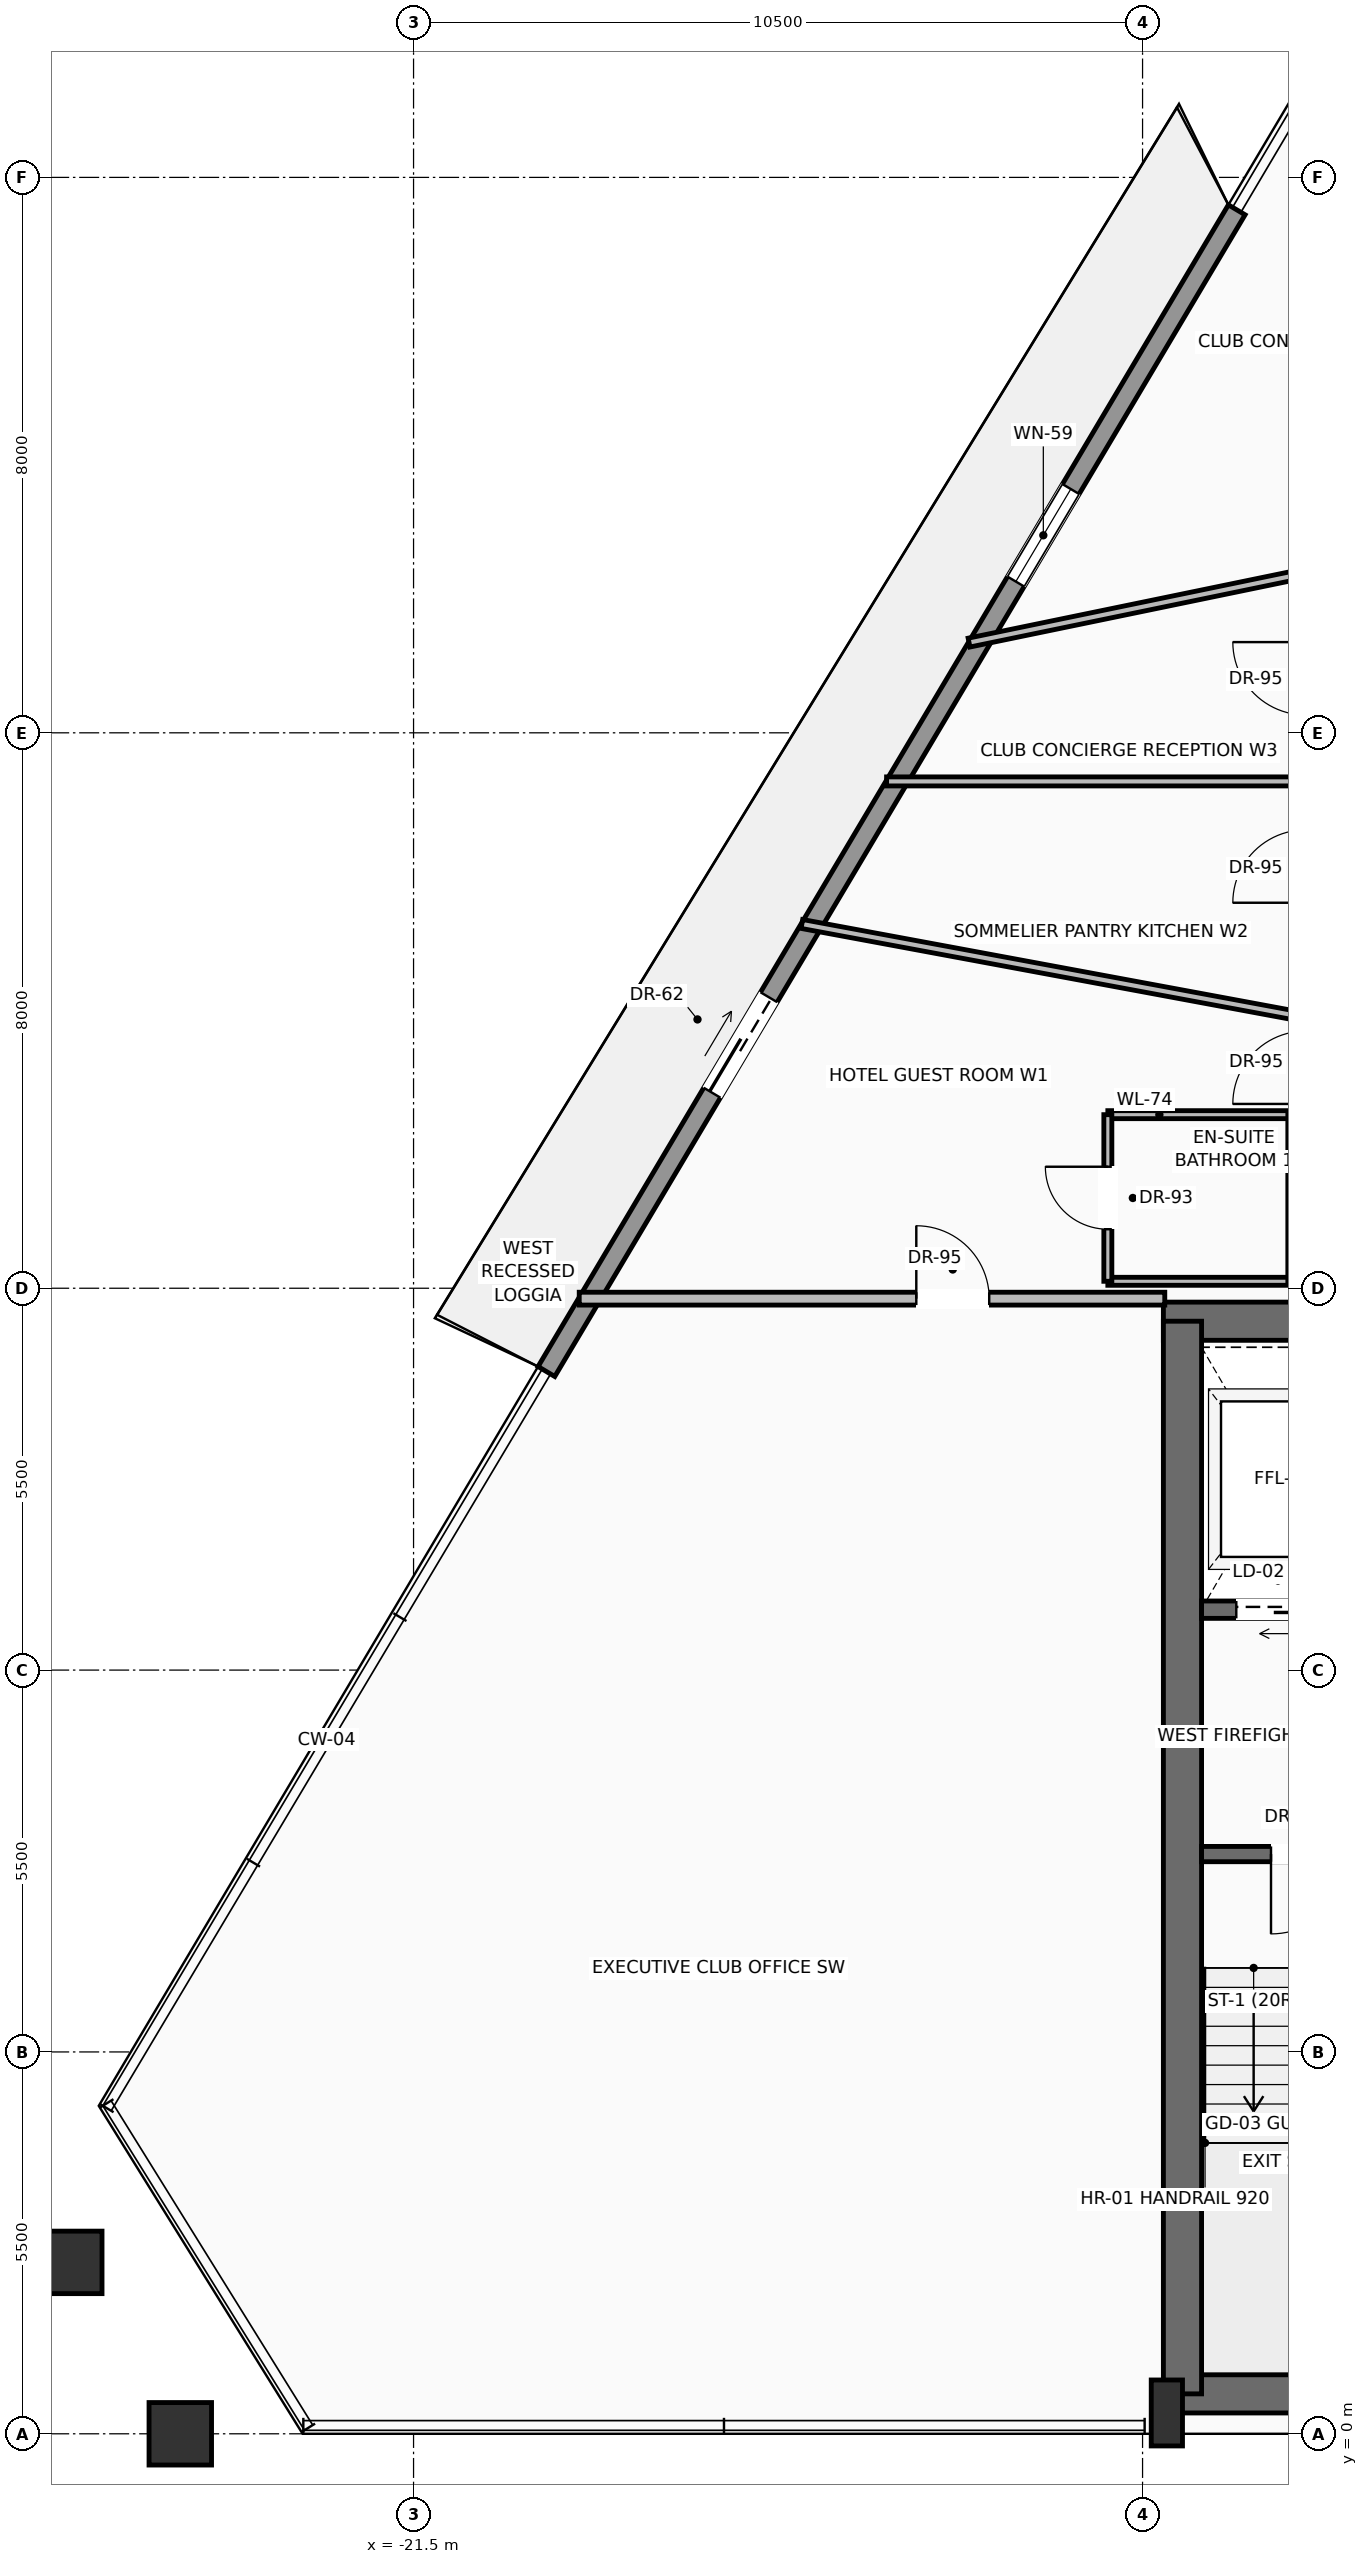
"""IFC4 building model, lengths in metres.
Left out: names, types, materials, properties, quantities, classifications, styles, units other than length and angle.
Written with IfcOpenShell. Run it as: python <this file> out.ifc"""

import sys

from ifc_helpers import new_model, si_unit, direction, frame, frame_2d, origin, origin_2d, place, context, subcontext, project, spatial, rectangle, hollow_rectangle, extrude, source, transform, mapped, element, fill, save


model = new_model("IFC4")
c1 = context("Model", 3, precision=1e-05, world=origin(), true_north=direction((0.0, 1.0)))
c2 = subcontext(c1, "Body", "Model", "MODEL_VIEW")
j1 = project(units=[si_unit("LENGTHUNIT", "METRE"), si_unit("PLANEANGLEUNIT", "RADIAN")], contexts=[c1])
p1 = place(None, origin())
s1 = spatial("IfcSite", under=j1, at=p1, CompositionType="ELEMENT")
p2 = place(p1, origin())
s2 = spatial("IfcBuilding", under=s1, at=p2, CompositionType="ELEMENT")
p3 = place(p2, frame((0.0, 0.0, 230.35)))
s3 = spatial("IfcBuildingStorey", under=s2, at=p3, CompositionType="ELEMENT", Elevation=230.35)
p4 = place(p3, frame((-10.65, 0.575, 0.0), z_axis=(0.0, 0.0, 1.0), x_axis=(1.0, 0.0, 0.0)))
e1 = element("IfcWall", 1, at=p4, inside=s3, PredefinedType="SHEAR", context=c2, shape_type="SweptSolid", body=[
    extrude(rectangle(XDim=21.3, YDim=0.55, at=frame_2d((10.65, 0.0))), origin(), (0.0, 0.0, 1.0), 3.24),
])
p5 = place(p3, frame((-10.7, 16.025, 0.0), z_axis=(0.0, 0.0, 1.0), x_axis=(1.0, 0.0, 0.0)))
e2 = element("IfcWall", 2, at=p5, inside=s3, PredefinedType="SHEAR", context=c2, shape_type="SweptSolid", body=[
    extrude(rectangle(XDim=21.4, YDim=0.55, at=frame_2d((10.7, 0.0))), origin(), (0.0, 0.0, 1.0), 3.24),
])
p6 = place(p5, frame((3.27, 0.0, 0.0)))
e3 = element("IfcOpeningElement", 3, at=p6, cuts=e2, PredefinedType="OPENING", context=c2, shape_type="SweptSolid", body=[
    extrude(rectangle(XDim=1.3, YDim=2.3, at=frame_2d((0.65, 1.15))), frame((0.0, 0.285, 0.0), z_axis=(0.0, -1.0, 0.0), x_axis=(1.0, 0.0, 0.0)), (0.0, 0.0, 1.0), 0.57),
])
p7 = place(p5, frame((9.7, 0.0, 0.0)))
e4 = element("IfcOpeningElement", 4, at=p7, cuts=e2, PredefinedType="OPENING", context=c2, shape_type="SweptSolid", body=[
    extrude(rectangle(XDim=2.0, YDim=2.4, at=frame_2d((1.0, 1.2))), frame((0.0, 0.285, 0.0), z_axis=(0.0, -1.0, 0.0), x_axis=(1.0, 0.0, 0.0)), (0.0, 0.0, 1.0), 0.57),
])
p8 = place(p3, frame((-10.425, 0.575, 0.0), z_axis=(0.0, 0.0, 1.0), x_axis=(0.0, 1.0, 0.0)))
e5 = element("IfcWall", 5, at=p8, inside=s3, PredefinedType="SHEAR", context=c2, shape_type="SweptSolid", body=[
    extrude(rectangle(XDim=15.45, YDim=0.55, at=frame_2d((7.725, 0.0))), origin(), (0.0, 0.0, 1.0), 3.24),
])
m1 = source(origin(), c2, "Body", "SweptSolid", [
    extrude(rectangle(XDim=0.45, YDim=0.95, at=origin_2d()), origin(), (0.0, 0.0, 1.0), 3.45),
])
p9 = place(p3, frame((-10.65, 0.3, 0.0), z_axis=(0.0, 0.0, 1.0), x_axis=(1.0, 0.0, 0.0)))
e6 = element("IfcColumn", 6, at=p9, inside=s3, PredefinedType="PILASTER", context=c2, shape_type="MappedRepresentation", body=[
    mapped(m1, transform((0.0, 0.0, 0.0), scale=1.0)),
])
m2 = source(origin(), c2, "Body", "SweptSolid", [
    extrude(hollow_rectangle(XDim=0.9, YDim=0.9, WallThickness=0.045, at=origin_2d()), origin(), (0.0, 0.0, 1.0), 3.441),
])
p10 = place(p3, frame((-24.86, 0.0, 0.004), z_axis=(-0.003973008728, 0.0, 0.99999210757), x_axis=(0.0, -1.0, 0.0)))
e7 = element("IfcColumn", 7, at=p10, inside=s3, PredefinedType="COLUMN", context=c2, shape_type="MappedRepresentation", body=[
    mapped(m2, transform((0.0, 0.0, 0.0), scale=1.0)),
])
m3 = source(origin(), c2, "Body", "SweptSolid", [
    extrude(hollow_rectangle(XDim=0.9, YDim=0.9, WallThickness=0.045, at=origin_2d()), origin(), (0.0, 0.0, 1.0), 3.442),
])
p11 = place(p3, frame((-26.437, 2.469, 0.004), z_axis=(0.008299266105, -0.017449738989, 0.999813296967), x_axis=(0.903063984632, 0.429506041471, 0.0)))
e8 = element("IfcColumn", 8, at=p11, inside=s3, PredefinedType="COLUMN", context=c2, shape_type="MappedRepresentation", body=[
    mapped(m3, transform((0.0, 0.0, 0.0), scale=1.0)),
])
p12 = place(p3, frame((-19.586, 15.3, 0.0), z_axis=(0.0, 0.0, 1.0), x_axis=(0.510822157644, 0.859686409838, 0.0)))
e9 = element("IfcWall", 9, at=p12, inside=s3, PredefinedType="SOLIDWALL", context=c2, shape_type="SweptSolid", body=[
    extrude(rectangle(XDim=19.464, YDim=0.28, at=frame_2d((9.732, 0.0))), origin(), (0.0, 0.0, 1.0), 2.82),
])
p13 = place(p12, frame((4.671, 0.0, 0.0)))
e10 = element("IfcOpeningElement", 10, at=p13, cuts=e9, PredefinedType="OPENING", context=c2, shape_type="SweptSolid", body=[
    extrude(rectangle(XDim=1.6, YDim=2.35, at=frame_2d((0.8, 1.175))), frame((0.0, 0.15, 0.0), z_axis=(0.0, -1.0, 0.0), x_axis=(1.0, 0.0, 0.0)), (0.0, 0.0, 1.0), 0.3),
])
p14 = place(p12, frame((13.236, 0.0, 0.9)))
e11 = element("IfcOpeningElement", 11, at=p14, cuts=e9, PredefinedType="OPENING", context=c2, shape_type="SweptSolid", body=[
    extrude(rectangle(XDim=1.55, YDim=1.75, at=frame_2d((0.775, 0.875))), frame((0.0, 0.15, 0.0), z_axis=(0.0, -1.0, 0.0), x_axis=(1.0, 0.0, 0.0)), (0.0, 0.0, 1.0), 0.3),
])
p15 = place(p3, frame((-5.5, 8.35, 0.0), z_axis=(0.0, 0.0, 1.0), x_axis=(-1.0, 0.0, 0.0)))
e12 = element("IfcWall", 12, at=p15, inside=s3, PredefinedType="SOLIDWALL", context=c2, shape_type="SweptSolid", body=[
    extrude(rectangle(XDim=4.65, YDim=0.22, at=frame_2d((2.325, 0.0))), origin(), (0.0, 0.0, 1.0), 3.24),
])
p16 = place(p15, frame((2.5, 0.0, 0.0)))
e13 = element("IfcOpeningElement", 13, at=p16, cuts=e12, PredefinedType="OPENING", context=c2, shape_type="SweptSolid", body=[
    extrude(rectangle(XDim=1.15, YDim=2.2, at=frame_2d((0.575, 1.1))), frame((0.0, 0.12, 0.0), z_axis=(0.0, -1.0, 0.0), x_axis=(1.0, 0.0, 0.0)), (0.0, 0.0, 1.0), 0.24),
])
p17 = place(p3, frame((-5.5, 11.87, 0.0), z_axis=(0.0, 0.0, 1.0), x_axis=(-1.0, 0.0, 0.0)))
e14 = element("IfcWall", 14, at=p17, inside=s3, PredefinedType="SOLIDWALL", context=c2, shape_type="SweptSolid", body=[
    extrude(rectangle(XDim=4.65, YDim=0.25, at=frame_2d((2.325, 0.0))), origin(), (0.0, 0.0, 1.0), 3.24),
])
p18 = place(p17, frame((2.95, 0.0, 0.0)))
e15 = element("IfcOpeningElement", 15, at=p18, cuts=e14, PredefinedType="OPENING", context=c2, shape_type="SweptSolid", body=[
    extrude(rectangle(XDim=1.2, YDim=2.25, at=frame_2d((0.6, 1.125))), frame((0.0, 0.135, 0.0), z_axis=(0.0, -1.0, 0.0), x_axis=(1.0, 0.0, 0.0)), (0.0, 0.0, 1.0), 0.27),
])
p19 = place(p3, frame((-19.114, 16.35, 0.0), z_axis=(0.0, 0.0, 1.0), x_axis=(1.0, 0.0, 0.0)))
e16 = element("IfcWall", 16, at=p19, inside=s3, PredefinedType="PARTITIONING", context=c2, shape_type="SweptSolid", body=[
    extrude(rectangle(XDim=8.434, YDim=0.185, at=frame_2d((4.217, 0.0))), origin(), (0.0, 0.0, 1.0), 3.232),
])
p20 = place(p19, frame((4.855, 0.0, 0.0)))
e17 = element("IfcOpeningElement", 17, at=p20, cuts=e16, PredefinedType="OPENING", context=c2, shape_type="SweptSolid", body=[
    extrude(rectangle(XDim=1.05, YDim=2.25, at=frame_2d((0.525, 1.125))), frame((0.0, 0.103, 0.0), z_axis=(0.0, -1.0, 0.0), x_axis=(1.0, 0.0, 0.0)), (0.0, 0.0, 1.0), 0.205),
])
p21 = place(p3, frame((-13.499, 25.799, 0.0), z_axis=(0.0, 0.0, 1.0), x_axis=(0.979359822394, 0.202124561301, 0.0)))
e18 = element("IfcWall", 18, at=p21, inside=s3, PredefinedType="PARTITIONING", context=c2, shape_type="SweptSolid", body=[
    extrude(rectangle(XDim=4.951, YDim=0.13, at=frame_2d((2.476, 0.0))), origin(), (0.0, 0.0, 1.0), 3.232),
])
for number, where, z_axis, x_axis in (
    (19, (-11.5, 16.6, 0.0), (0.0, 0.0, 1.0), (1.0, 0.0, 0.0)),
    (20, (-11.5, 19.0, 0.0), (0.0, 0.0, 1.0), (1.0, 0.0, 0.0)),
):
    element("IfcWall", number, at=place(p3, frame(where, z_axis=z_axis, x_axis=x_axis)), inside=s3, PredefinedType="PARTITIONING", context=c2, shape_type="SweptSolid", body=[
        extrude(rectangle(XDim=2.65, YDim=0.115, at=frame_2d((1.325, 0.0))), origin(), (0.0, 0.0, 1.0), 3.232),
    ])
p22 = place(p3, frame((-11.5, 16.6, 0.0), z_axis=(0.0, 0.0, 1.0), x_axis=(0.0, 1.0, 0.0)))
e21 = element("IfcWall", 21, at=p22, inside=s3, PredefinedType="PARTITIONING", context=c2, shape_type="SweptSolid", body=[
    extrude(rectangle(XDim=2.4, YDim=0.115, at=frame_2d((1.2, 0.0))), origin(), (0.0, 0.0, 1.0), 3.232),
])
p23 = place(p22, frame((0.75, 0.0, 0.0)))
e22 = element("IfcOpeningElement", 22, at=p23, cuts=e21, PredefinedType="OPENING", context=c2, shape_type="SweptSolid", body=[
    extrude(rectangle(XDim=0.9, YDim=2.15, at=frame_2d((0.45, 1.075))), frame((0.0, 0.067, 0.0), z_axis=(0.0, -1.0, 0.0), x_axis=(1.0, 0.0, 0.0)), (0.0, 0.0, 1.0), 0.135),
])
p24 = place(p3, frame((-8.85, 16.6, 0.0), z_axis=(0.0, 0.0, 1.0), x_axis=(0.0, 1.0, 0.0)))
e23 = element("IfcWall", 23, at=p24, inside=s3, PredefinedType="PARTITIONING", context=c2, shape_type="SweptSolid", body=[
    extrude(rectangle(XDim=2.4, YDim=0.115, at=frame_2d((1.2, 0.0))), origin(), (0.0, 0.0, 1.0), 3.232),
])
p25 = place(p3, frame((-15.907, 21.747, 0.0), z_axis=(0.0, 0.0, 1.0), x_axis=(0.98321459924, -0.182452875674, 0.0)))
e24 = element("IfcWall", 24, at=p25, inside=s3, PredefinedType="PARTITIONING", context=c2, shape_type="SweptSolid", body=[
    extrude(rectangle(XDim=7.381, YDim=0.13, at=frame_2d((3.69, 0.0))), origin(), (0.0, 0.0, 1.0), 3.232),
])
p26 = place(p3, frame((-14.687, 23.8, 0.0), z_axis=(0.0, 0.0, 1.0), x_axis=(1.0, 0.0, 0.0)))
e25 = element("IfcWall", 25, at=p26, inside=s3, PredefinedType="PARTITIONING", context=c2, shape_type="SweptSolid", body=[
    extrude(rectangle(XDim=6.037, YDim=0.13, at=frame_2d((3.019, 0.0))), origin(), (0.0, 0.0, 1.0), 3.232),
])
m4 = source(origin(), c2, "Body", "SweptSolid", [
    extrude(rectangle(XDim=1.6, YDim=2.35, at=frame_2d((0.8, 1.175))), frame((0.0, 0.025, 0.0), z_axis=(0.0, -1.0, 0.0), x_axis=(1.0, 0.0, 0.0)), (0.0, 0.0, 1.0), 0.05),
])
p27 = place(p13, origin())
e26 = element("IfcDoor", 26, at=p27, inside=s3, OperationType="SLIDING_TO_LEFT", PredefinedType="DOOR", context=c2, shape_type="MappedRepresentation", body=[
    mapped(m4, transform((0.0, 0.0, 0.0), scale=1.0)),
])
fill(e10, e26)
m5 = source(origin(), c2, "Body", "SweptSolid", [
    extrude(rectangle(XDim=1.55, YDim=1.75, at=frame_2d((0.775, 0.875))), frame((0.0, 0.03, 0.0), z_axis=(0.0, -1.0, 0.0), x_axis=(1.0, 0.0, 0.0)), (0.0, 0.0, 1.0), 0.06),
])
p28 = place(p14, origin())
e27 = element("IfcWindow", 27, at=p28, inside=s3, PartitioningType="SINGLE_PANEL", PredefinedType="WINDOW", context=c2, shape_type="MappedRepresentation", body=[
    mapped(m5, transform((0.0, 0.0, 0.0), scale=1.0)),
])
fill(e11, e27)
m6 = source(origin(), c2, "Body", "SweptSolid", [
    extrude(rectangle(XDim=1.15, YDim=2.2, at=frame_2d((0.575, 1.1))), frame((0.0, 0.025, 0.0), z_axis=(0.0, -1.0, 0.0), x_axis=(1.0, 0.0, 0.0)), (0.0, 0.0, 1.0), 0.05),
])
p29 = place(p16, origin())
e28 = element("IfcDoor", 28, at=p29, inside=s3, OperationType="SINGLE_SWING_RIGHT", PredefinedType="DOOR", context=c2, shape_type="MappedRepresentation", body=[
    mapped(m6, transform((0.0, 0.0, 0.0), scale=1.0)),
])
fill(e13, e28)
m7 = source(origin(), c2, "Body", "SweptSolid", [
    extrude(rectangle(XDim=1.2, YDim=2.25, at=frame_2d((0.6, 1.125))), frame((0.0, 0.025, 0.0), z_axis=(0.0, -1.0, 0.0), x_axis=(1.0, 0.0, 0.0)), (0.0, 0.0, 1.0), 0.05),
])
p30 = place(p18, origin())
e29 = element("IfcDoor", 29, at=p30, inside=s3, OperationType="SLIDING_TO_LEFT", PredefinedType="DOOR", context=c2, shape_type="MappedRepresentation", body=[
    mapped(m7, transform((0.0, 0.0, 0.0), scale=1.0)),
])
fill(e15, e29)
m8 = source(origin(), c2, "Body", "SweptSolid", [
    extrude(rectangle(XDim=1.05, YDim=2.25, at=frame_2d((0.525, 1.125))), frame((0.0, 0.025, 0.0), z_axis=(0.0, -1.0, 0.0), x_axis=(1.0, 0.0, 0.0)), (0.0, 0.0, 1.0), 0.05),
])
p31 = place(p20, origin())
e30 = element("IfcDoor", 30, at=p31, inside=s3, OperationType="SINGLE_SWING_LEFT", PredefinedType="DOOR", context=c2, shape_type="MappedRepresentation", body=[
    mapped(m8, transform((0.0, 0.0, 0.0), scale=1.0)),
])
fill(e17, e30)
m9 = source(origin(), c2, "Body", "SweptSolid", [
    extrude(rectangle(XDim=0.9, YDim=2.15, at=frame_2d((0.45, 1.075))), frame((0.0, 0.025, 0.0), z_axis=(0.0, -1.0, 0.0), x_axis=(1.0, 0.0, 0.0)), (0.0, 0.0, 1.0), 0.05),
])
p32 = place(p23, origin())
e31 = element("IfcDoor", 31, at=p32, inside=s3, OperationType="SINGLE_SWING_RIGHT", PredefinedType="DOOR", context=c2, shape_type="MappedRepresentation", body=[
    mapped(m9, transform((0.0, 0.0, 0.0), scale=1.0)),
])
fill(e22, e31)
save(model, sys.argv[1])
